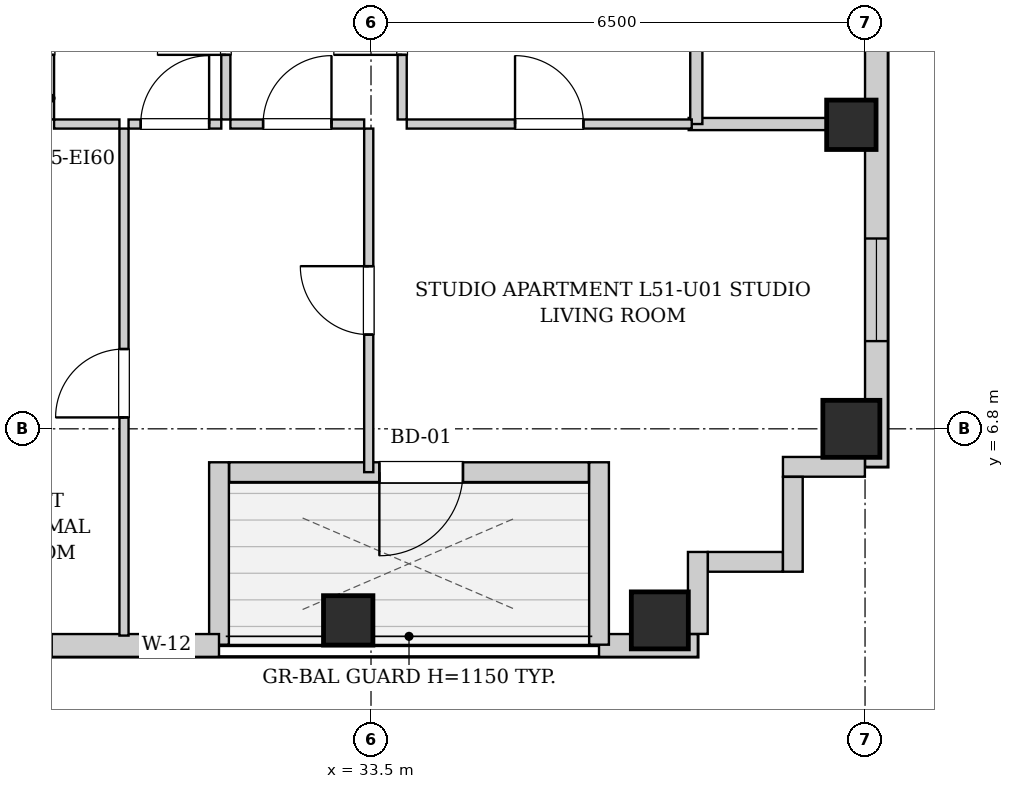
"""IFC4 building model, lengths in metres.
Left out: names, types, materials, properties, quantities, classifications, styles, units other than length and angle.
Written with IfcOpenShell. Run it as: python <this file> out.ifc"""

import sys

from ifc_helpers import new_model, si_unit, direction, frame, frame_2d, origin, origin_2d, place, context, subcontext, project, spatial, rectangle, extrude, element, fill, save


model = new_model("IFC4")
c1 = context("Model", 3, precision=1e-05, world=origin(), true_north=direction((0.0, 1.0)))
c2 = subcontext(c1, "Body", "Model", "MODEL_VIEW")
j1 = project(units=[si_unit("LENGTHUNIT", "METRE"), si_unit("PLANEANGLEUNIT", "RADIAN")], contexts=[c1])
p1 = place(None, origin())
s1 = spatial("IfcSite", under=j1, at=p1, CompositionType="ELEMENT")
p2 = place(p1, origin())
s2 = spatial("IfcBuilding", under=s1, at=p2, CompositionType="ELEMENT")
p3 = place(p2, frame((0.0, 0.0, 177.7)))
s3 = spatial("IfcBuildingStorey", under=s2, at=p3, CompositionType="ELEMENT", Elevation=177.7)
p4 = place(p3, frame((33.2, 4.28, 0.0), z_axis=(0.0, 0.0, 1.0), x_axis=(1.0, 0.0, 0.0)))
e1 = element("IfcColumn", 1, at=p4, inside=s3, PredefinedType="COLUMN", context=c2, shape_type="SweptSolid", body=[
    extrude(rectangle(XDim=0.65, YDim=0.65, at=origin_2d()), origin(), (0.0, 0.0, 1.0), 3.3),
])
for number, where, z_axis, x_axis in (
    (2, (37.3, 4.28, 0.0), (0.0, 0.0, 1.0), (1.0, 0.0, 0.0)),
    (3, (39.82, 6.8, 0.0), (0.0, 0.0, 1.0), (1.0, 0.0, 0.0)),
):
    element("IfcColumn", number, at=place(p3, frame(where, z_axis=z_axis, x_axis=x_axis)), inside=s3, PredefinedType="COLUMN", context=c2, shape_type="SweptSolid", body=[
        extrude(rectangle(XDim=0.75, YDim=0.75, at=origin_2d()), origin(), (0.0, 0.0, 1.0), 3.3),
    ])
p5 = place(p3, frame((39.82, 10.8, 0.0), z_axis=(0.0, 0.0, 1.0), x_axis=(1.0, 0.0, 0.0)))
e4 = element("IfcColumn", 4, at=p5, inside=s3, PredefinedType="COLUMN", context=c2, shape_type="SweptSolid", body=[
    extrude(rectangle(XDim=0.65, YDim=0.65, at=origin_2d()), origin(), (0.0, 0.0, 1.0), 3.3),
])
p6 = place(p3, frame((40.15, 37.7, 0.0), z_axis=(0.0, 0.0, 1.0), x_axis=(0.0, -1.0, 0.0)))
e5 = element("IfcWall", 5, at=p6, inside=s3, PredefinedType="SOLIDWALL", context=c2, shape_type="SweptSolid", body=[
    extrude(rectangle(XDim=31.4, YDim=0.3, at=frame_2d((15.7, 0.0))), origin(), (0.0, 0.0, 1.0), 3.04),
])
p7 = place(p6, frame((28.396, 0.0, 0.55)))
e6 = element("IfcOpeningElement", 6, at=p7, cuts=e5, PredefinedType="OPENING", context=c2, shape_type="SweptSolid", body=[
    extrude(rectangle(XDim=1.35, YDim=1.2, at=frame_2d((0.675, 0.6))), frame((0.0, 0.16, 0.0), z_axis=(0.0, -1.0, 0.0), x_axis=(1.0, 0.0, 0.0)), (0.0, 0.0, 1.0), 0.32),
])
p8 = place(p6, frame((1.653, 0.0, 0.55)))
e7 = element("IfcOpeningElement", 7, at=p8, cuts=e5, PredefinedType="OPENING", context=c2, shape_type="SweptSolid", body=[
    extrude(rectangle(XDim=1.35, YDim=1.2, at=frame_2d((0.675, 0.6))), frame((0.0, 0.16, 0.0), z_axis=(0.0, -1.0, 0.0), x_axis=(1.0, 0.0, 0.0)), (0.0, 0.0, 1.0), 0.32),
])
p9 = place(p6, frame((19.683, 0.0, 0.55)))
e8 = element("IfcOpeningElement", 8, at=p9, cuts=e5, PredefinedType="OPENING", context=c2, shape_type="SweptSolid", body=[
    extrude(rectangle(XDim=1.35, YDim=1.2, at=frame_2d((0.675, 0.6))), frame((0.0, 0.16, 0.0), z_axis=(0.0, -1.0, 0.0), x_axis=(1.0, 0.0, 0.0)), (0.0, 0.0, 1.0), 0.32),
])
p10 = place(p6, frame((10.367, 0.0, 0.55)))
e9 = element("IfcOpeningElement", 9, at=p10, cuts=e5, PredefinedType="OPENING", context=c2, shape_type="SweptSolid", body=[
    extrude(rectangle(XDim=1.35, YDim=1.2, at=frame_2d((0.675, 0.6))), frame((0.0, 0.16, 0.0), z_axis=(0.0, -1.0, 0.0), x_axis=(1.0, 0.0, 0.0)), (0.0, 0.0, 1.0), 0.32),
])
p11 = place(p3, frame((37.8, 3.95, 0.0), z_axis=(0.0, 0.0, 1.0), x_axis=(-1.0, 0.0, 0.0)))
e10 = element("IfcWall", 10, at=p11, inside=s3, PredefinedType="SOLIDWALL", context=c2, shape_type="SweptSolid", body=[
    extrude(rectangle(XDim=1.3, YDim=0.3, at=frame_2d((0.65, 0.0))), origin(), (0.0, 0.0, 1.0), 3.04),
])
p12 = place(p3, frame((36.5, 3.96, 0.0), z_axis=(0.0, 0.0, 1.0), x_axis=(0.0, 1.0, 0.0)))
e11 = element("IfcWall", 11, at=p12, inside=s3, PredefinedType="SOLIDWALL", context=c2, shape_type="SweptSolid", body=[
    extrude(rectangle(XDim=2.4, YDim=0.26, at=frame_2d((1.2, 0.0))), origin(), (0.0, 0.0, 1.0), 3.04),
])
p13 = place(p3, frame((36.366, 6.23, 0.0), z_axis=(0.0, 0.0, 1.0), x_axis=(-1.0, 0.0, 0.0)))
e12 = element("IfcWall", 12, at=p13, inside=s3, PredefinedType="SOLIDWALL", context=c2, shape_type="SweptSolid", body=[
    extrude(rectangle(XDim=4.732, YDim=0.26, at=frame_2d((2.366, 0.0))), origin(), (0.0, 0.0, 1.0), 3.04),
])
p14 = place(p13, frame((1.656, 0.0, 0.0)))
e13 = element("IfcOpeningElement", 13, at=p14, cuts=e12, PredefinedType="OPENING", context=c2, shape_type="SweptSolid", body=[
    extrude(rectangle(XDim=1.1, YDim=2.0, at=frame_2d((0.55, 1.0))), frame((0.0, 0.14, 0.0), z_axis=(0.0, -1.0, 0.0), x_axis=(1.0, 0.0, 0.0)), (0.0, 0.0, 1.0), 0.28),
])
p15 = place(p3, frame((31.5, 6.36, 0.0), z_axis=(0.0, 0.0, 1.0), x_axis=(0.0, -1.0, 0.0)))
e14 = element("IfcWall", 14, at=p15, inside=s3, PredefinedType="SOLIDWALL", context=c2, shape_type="SweptSolid", body=[
    extrude(rectangle(XDim=2.4, YDim=0.26, at=frame_2d((1.2, 0.0))), origin(), (0.0, 0.0, 1.0), 3.04),
])
p16 = place(p3, frame((31.5, 3.95, 0.0), z_axis=(0.0, 0.0, 1.0), x_axis=(-1.0, 0.0, 0.0)))
e15 = element("IfcWall", 15, at=p16, inside=s3, PredefinedType="SOLIDWALL", context=c2, shape_type="SweptSolid", body=[
    extrude(rectangle(XDim=11.2, YDim=0.3, at=frame_2d((5.6, 0.0))), origin(), (0.0, 0.0, 1.0), 3.04),
])
p17 = place(p16, frame((9.0, 0.0, 0.55)))
e16 = element("IfcOpeningElement", 16, at=p17, cuts=e15, PredefinedType="OPENING", context=c2, shape_type="SweptSolid", body=[
    extrude(rectangle(XDim=1.35, YDim=1.2, at=frame_2d((0.675, 0.6))), frame((0.0, 0.16, 0.0), z_axis=(0.0, -1.0, 0.0), x_axis=(1.0, 0.0, 0.0)), (0.0, 0.0, 1.0), 0.32),
])
p18 = place(p16, frame((2.201, 0.0, 0.55)))
e17 = element("IfcOpeningElement", 17, at=p18, cuts=e15, PredefinedType="OPENING", context=c2, shape_type="SweptSolid", body=[
    extrude(rectangle(XDim=1.35, YDim=1.2, at=frame_2d((0.675, 0.6))), frame((0.0, 0.16, 0.0), z_axis=(0.0, -1.0, 0.0), x_axis=(1.0, 0.0, 0.0)), (0.0, 0.0, 1.0), 0.32),
])
p19 = place(p16, frame((0.35, 0.0, 0.55)))
e18 = element("IfcOpeningElement", 18, at=p19, cuts=e15, PredefinedType="OPENING", context=c2, shape_type="SweptSolid", body=[
    extrude(rectangle(XDim=0.68, YDim=1.2, at=frame_2d((0.34, 0.6))), frame((0.0, 0.16, 0.0), z_axis=(0.0, -1.0, 0.0), x_axis=(1.0, 0.0, 0.0)), (0.0, 0.0, 1.0), 0.32),
])
p20 = place(p3, frame((39.998, 6.3, 0.0), z_axis=(0.0, 0.0, 1.0), x_axis=(-1.0, 0.0, 0.0)))
e19 = element("IfcWall", 19, at=p20, inside=s3, PredefinedType="SOLIDWALL", context=c2, shape_type="SweptSolid", body=[
    extrude(rectangle(XDim=1.078, YDim=0.26, at=frame_2d((0.539, 0.0))), origin(), (0.0, 0.0, 1.0), 3.04),
])
p21 = place(p3, frame((39.05, 6.168, 0.0), z_axis=(0.0, 0.0, 1.0), x_axis=(0.0, -1.0, 0.0)))
e20 = element("IfcWall", 20, at=p21, inside=s3, PredefinedType="SOLIDWALL", context=c2, shape_type="SweptSolid", body=[
    extrude(rectangle(XDim=1.248, YDim=0.26, at=frame_2d((0.624, 0.0))), origin(), (0.0, 0.0, 1.0), 3.04),
])
p22 = place(p3, frame((38.918, 5.05, 0.0), z_axis=(0.0, 0.0, 1.0), x_axis=(-1.0, 0.0, 0.0)))
e21 = element("IfcWall", 21, at=p22, inside=s3, PredefinedType="SOLIDWALL", context=c2, shape_type="SweptSolid", body=[
    extrude(rectangle(XDim=0.986, YDim=0.26, at=frame_2d((0.493, 0.0))), origin(), (0.0, 0.0, 1.0), 3.04),
])
p23 = place(p3, frame((37.8, 5.18, 0.0), z_axis=(0.0, 0.0, 1.0), x_axis=(0.0, -1.0, 0.0)))
e22 = element("IfcWall", 22, at=p23, inside=s3, PredefinedType="SOLIDWALL", context=c2, shape_type="SweptSolid", body=[
    extrude(rectangle(XDim=1.078, YDim=0.26, at=frame_2d((0.539, 0.0))), origin(), (0.0, 0.0, 1.0), 3.04),
])
p24 = place(p3, frame((37.68, 10.81, 0.0), z_axis=(0.0, 0.0, 1.0), x_axis=(1.0, 0.0, 0.0)))
e23 = element("IfcWall", 23, at=p24, inside=s3, PredefinedType="PARTITIONING", context=c2, shape_type="SweptSolid", body=[
    extrude(rectangle(XDim=2.34, YDim=0.16, at=frame_2d((1.17, 0.0))), origin(), (0.0, 0.0, 1.0), 3.04),
])
p25 = place(p3, frame((37.78, 10.81, 0.0), z_axis=(0.0, 0.0, 1.0), x_axis=(0.0, 1.0, 0.0)))
e24 = element("IfcWall", 24, at=p25, inside=s3, PredefinedType="PARTITIONING", context=c2, shape_type="SweptSolid", body=[
    extrude(rectangle(XDim=2.66, YDim=0.16, at=frame_2d((1.33, 0.0))), origin(), (0.0, 0.0, 1.0), 3.04),
])
p26 = place(p3, frame((29.27, 10.87, 0.0), z_axis=(0.0, 0.0, 1.0), x_axis=(0.0, 1.0, 0.0)))
e25 = element("IfcWall", 25, at=p26, inside=s3, PredefinedType="PARTITIONING", context=c2, shape_type="SweptSolid", body=[
    extrude(rectangle(XDim=2.6, YDim=0.12, at=frame_2d((1.3, 0.0))), origin(), (0.0, 0.0, 1.0), 3.04),
])
p27 = place(p26, frame((0.85, 0.0, 0.0)))
e26 = element("IfcOpeningElement", 26, at=p27, cuts=e25, PredefinedType="OPENING", context=c2, shape_type="SweptSolid", body=[
    extrude(rectangle(XDim=0.9, YDim=2.05, at=frame_2d((0.45, 1.025))), frame((0.0, 0.07, 0.0), z_axis=(0.0, -1.0, 0.0), x_axis=(1.0, 0.0, 0.0)), (0.0, 0.0, 1.0), 0.14),
])
p28 = place(p3, frame((31.59, 10.87, 0.0), z_axis=(0.0, 0.0, 1.0), x_axis=(0.0, 1.0, 0.0)))
e27 = element("IfcWall", 27, at=p28, inside=s3, PredefinedType="PARTITIONING", context=c2, shape_type="SweptSolid", body=[
    extrude(rectangle(XDim=2.6, YDim=0.12, at=frame_2d((1.3, 0.0))), origin(), (0.0, 0.0, 1.0), 3.04),
])
p29 = place(p28, frame((0.85, 0.0, 0.0)))
e28 = element("IfcOpeningElement", 28, at=p29, cuts=e27, PredefinedType="OPENING", context=c2, shape_type="SweptSolid", body=[
    extrude(rectangle(XDim=0.9, YDim=2.05, at=frame_2d((0.45, 1.025))), frame((0.0, 0.07, 0.0), z_axis=(0.0, -1.0, 0.0), x_axis=(1.0, 0.0, 0.0)), (0.0, 0.0, 1.0), 0.14),
])
p30 = place(p3, frame((29.33, 10.81, 0.0), z_axis=(0.0, 0.0, 1.0), x_axis=(1.0, 0.0, 0.0)))
e29 = element("IfcWall", 29, at=p30, inside=s3, PredefinedType="PARTITIONING", context=c2, shape_type="SweptSolid", body=[
    extrude(rectangle(XDim=0.86, YDim=0.12, at=frame_2d((0.43, 0.0))), origin(), (0.0, 0.0, 1.0), 3.04),
])
p31 = place(p3, frame((30.31, 10.81, 0.0), z_axis=(0.0, 0.0, 1.0), x_axis=(1.0, 0.0, 0.0)))
e30 = element("IfcWall", 30, at=p31, inside=s3, PredefinedType="PARTITIONING", context=c2, shape_type="SweptSolid", body=[
    extrude(rectangle(XDim=1.22, YDim=0.12, at=frame_2d((0.61, 0.0))), origin(), (0.0, 0.0, 1.0), 3.04),
])
p32 = place(p31, frame((0.16, 0.0, 0.0)))
e31 = element("IfcOpeningElement", 31, at=p32, cuts=e30, PredefinedType="OPENING", context=c2, shape_type="SweptSolid", body=[
    extrude(rectangle(XDim=0.9, YDim=2.05, at=frame_2d((0.45, 1.025))), frame((0.0, 0.07, 0.0), z_axis=(0.0, -1.0, 0.0), x_axis=(1.0, 0.0, 0.0)), (0.0, 0.0, 1.0), 0.14),
])
p33 = place(p3, frame((33.91, 10.87, 0.0), z_axis=(0.0, 0.0, 1.0), x_axis=(0.0, 1.0, 0.0)))
e32 = element("IfcWall", 32, at=p33, inside=s3, PredefinedType="PARTITIONING", context=c2, shape_type="SweptSolid", body=[
    extrude(rectangle(XDim=2.6, YDim=0.12, at=frame_2d((1.3, 0.0))), origin(), (0.0, 0.0, 1.0), 3.04),
])
p34 = place(p33, frame((0.85, 0.0, 0.0)))
e33 = element("IfcOpeningElement", 33, at=p34, cuts=e32, PredefinedType="OPENING", context=c2, shape_type="SweptSolid", body=[
    extrude(rectangle(XDim=0.9, YDim=2.05, at=frame_2d((0.45, 1.025))), frame((0.0, 0.07, 0.0), z_axis=(0.0, -1.0, 0.0), x_axis=(1.0, 0.0, 0.0)), (0.0, 0.0, 1.0), 0.14),
])
p35 = place(p3, frame((31.65, 10.81, 0.0), z_axis=(0.0, 0.0, 1.0), x_axis=(1.0, 0.0, 0.0)))
e34 = element("IfcWall", 34, at=p35, inside=s3, PredefinedType="PARTITIONING", context=c2, shape_type="SweptSolid", body=[
    extrude(rectangle(XDim=1.76, YDim=0.12, at=frame_2d((0.88, 0.0))), origin(), (0.0, 0.0, 1.0), 3.04),
])
p36 = place(p35, frame((0.43, 0.0, 0.0)))
e35 = element("IfcOpeningElement", 35, at=p36, cuts=e34, PredefinedType="OPENING", context=c2, shape_type="SweptSolid", body=[
    extrude(rectangle(XDim=0.9, YDim=2.05, at=frame_2d((0.45, 1.025))), frame((0.0, 0.07, 0.0), z_axis=(0.0, -1.0, 0.0), x_axis=(1.0, 0.0, 0.0)), (0.0, 0.0, 1.0), 0.14),
])
p37 = place(p3, frame((33.97, 10.81, 0.0), z_axis=(0.0, 0.0, 1.0), x_axis=(1.0, 0.0, 0.0)))
e36 = element("IfcWall", 36, at=p37, inside=s3, PredefinedType="PARTITIONING", context=c2, shape_type="SweptSolid", body=[
    extrude(rectangle(XDim=3.75, YDim=0.12, at=frame_2d((1.875, 0.0))), origin(), (0.0, 0.0, 1.0), 3.04),
])
p38 = place(p37, frame((1.425, 0.0, 0.0)))
e37 = element("IfcOpeningElement", 37, at=p38, cuts=e36, PredefinedType="OPENING", context=c2, shape_type="SweptSolid", body=[
    extrude(rectangle(XDim=0.9, YDim=2.05, at=frame_2d((0.45, 1.025))), frame((0.0, 0.07, 0.0), z_axis=(0.0, -1.0, 0.0), x_axis=(1.0, 0.0, 0.0)), (0.0, 0.0, 1.0), 0.14),
])
p39 = place(p3, frame((30.25, 4.08, 0.0), z_axis=(0.0, 0.0, 1.0), x_axis=(0.0, 1.0, 0.0)))
e38 = element("IfcWall", 38, at=p39, inside=s3, PredefinedType="PARTITIONING", context=c2, shape_type="SweptSolid", body=[
    extrude(rectangle(XDim=6.67, YDim=0.12, at=frame_2d((3.335, 0.0))), origin(), (0.0, 0.0, 1.0), 3.04),
])
p40 = place(p39, frame((2.87, 0.0, 0.0)))
e39 = element("IfcOpeningElement", 39, at=p40, cuts=e38, PredefinedType="OPENING", context=c2, shape_type="SweptSolid", body=[
    extrude(rectangle(XDim=0.9, YDim=2.05, at=frame_2d((0.45, 1.025))), frame((0.0, 0.07, 0.0), z_axis=(0.0, -1.0, 0.0), x_axis=(1.0, 0.0, 0.0)), (0.0, 0.0, 1.0), 0.14),
])
p41 = place(p3, frame((33.47, 6.23, 0.0), z_axis=(0.0, 0.0, 1.0), x_axis=(0.0, 1.0, 0.0)))
e40 = element("IfcWall", 40, at=p41, inside=s3, PredefinedType="PARTITIONING", context=c2, shape_type="SweptSolid", body=[
    extrude(rectangle(XDim=4.52, YDim=0.12, at=frame_2d((2.26, 0.0))), origin(), (0.0, 0.0, 1.0), 3.04),
])
p42 = place(p41, frame((1.81, 0.0, 0.0)))
e41 = element("IfcOpeningElement", 41, at=p42, cuts=e40, PredefinedType="OPENING", context=c2, shape_type="SweptSolid", body=[
    extrude(rectangle(XDim=0.9, YDim=2.05, at=frame_2d((0.45, 1.025))), frame((0.0, 0.07, 0.0), z_axis=(0.0, -1.0, 0.0), x_axis=(1.0, 0.0, 0.0)), (0.0, 0.0, 1.0), 0.14),
])
p43 = place(p29, origin())
e42 = element("IfcDoor", 42, at=p43, inside=s3, OperationType="SINGLE_SWING_LEFT", PredefinedType="DOOR", context=c2, shape_type="SweptSolid", body=[
    extrude(rectangle(XDim=0.9, YDim=2.05, at=frame_2d((0.45, 1.025))), frame((0.0, 0.025, 0.0), z_axis=(0.0, -1.0, 0.0), x_axis=(1.0, 0.0, 0.0)), (0.0, 0.0, 1.0), 0.05),
])
fill(e28, e42)
p44 = place(p32, origin())
e43 = element("IfcDoor", 43, at=p44, inside=s3, OperationType="SINGLE_SWING_RIGHT", PredefinedType="DOOR", context=c2, shape_type="SweptSolid", body=[
    extrude(rectangle(XDim=0.9, YDim=2.05, at=frame_2d((0.45, 1.025))), frame((0.0, 0.025, 0.0), z_axis=(0.0, -1.0, 0.0), x_axis=(1.0, 0.0, 0.0)), (0.0, 0.0, 1.0), 0.05),
])
fill(e31, e43)
p45 = place(p34, origin())
e44 = element("IfcDoor", 44, at=p45, inside=s3, OperationType="SINGLE_SWING_LEFT", PredefinedType="DOOR", context=c2, shape_type="SweptSolid", body=[
    extrude(rectangle(XDim=0.9, YDim=2.05, at=frame_2d((0.45, 1.025))), frame((0.0, 0.025, 0.0), z_axis=(0.0, -1.0, 0.0), x_axis=(1.0, 0.0, 0.0)), (0.0, 0.0, 1.0), 0.05),
])
fill(e33, e44)
p46 = place(p36, origin())
e45 = element("IfcDoor", 45, at=p46, inside=s3, OperationType="SINGLE_SWING_RIGHT", PredefinedType="DOOR", context=c2, shape_type="SweptSolid", body=[
    extrude(rectangle(XDim=0.9, YDim=2.05, at=frame_2d((0.45, 1.025))), frame((0.0, 0.025, 0.0), z_axis=(0.0, -1.0, 0.0), x_axis=(1.0, 0.0, 0.0)), (0.0, 0.0, 1.0), 0.05),
])
fill(e35, e45)
p47 = place(p38, origin())
e46 = element("IfcDoor", 46, at=p47, inside=s3, OperationType="SINGLE_SWING_LEFT", PredefinedType="DOOR", context=c2, shape_type="SweptSolid", body=[
    extrude(rectangle(XDim=0.9, YDim=2.05, at=frame_2d((0.45, 1.025))), frame((0.0, 0.025, 0.0), z_axis=(0.0, -1.0, 0.0), x_axis=(1.0, 0.0, 0.0)), (0.0, 0.0, 1.0), 0.05),
])
fill(e37, e46)
p48 = place(p40, origin())
e47 = element("IfcDoor", 47, at=p48, inside=s3, OperationType="SINGLE_SWING_LEFT", PredefinedType="DOOR", context=c2, shape_type="SweptSolid", body=[
    extrude(rectangle(XDim=0.9, YDim=2.05, at=frame_2d((0.45, 1.025))), frame((0.0, 0.025, 0.0), z_axis=(0.0, -1.0, 0.0), x_axis=(1.0, 0.0, 0.0)), (0.0, 0.0, 1.0), 0.05),
])
fill(e39, e47)
p49 = place(p42, origin())
e48 = element("IfcDoor", 48, at=p49, inside=s3, OperationType="SINGLE_SWING_RIGHT", PredefinedType="DOOR", context=c2, shape_type="SweptSolid", body=[
    extrude(rectangle(XDim=0.9, YDim=2.05, at=frame_2d((0.45, 1.025))), frame((0.0, 0.025, 0.0), z_axis=(0.0, -1.0, 0.0), x_axis=(1.0, 0.0, 0.0)), (0.0, 0.0, 1.0), 0.05),
])
fill(e41, e48)
p50 = place(p14, origin())
e49 = element("IfcDoor", 49, at=p50, inside=s3, OperationType="SINGLE_SWING_RIGHT", PredefinedType="DOOR", context=c2, shape_type="SweptSolid", body=[
    extrude(rectangle(XDim=1.1, YDim=2.0, at=frame_2d((0.55, 1.0))), frame((0.0, 0.025, 0.0), z_axis=(0.0, -1.0, 0.0), x_axis=(1.0, 0.0, 0.0)), (0.0, 0.0, 1.0), 0.05),
])
fill(e13, e49)
p51 = place(p19, origin())
e50 = element("IfcWindow", 50, at=p51, inside=s3, PartitioningType="SINGLE_PANEL", PredefinedType="WINDOW", context=c2, shape_type="SweptSolid", body=[
    extrude(rectangle(XDim=0.68, YDim=1.2, at=frame_2d((0.34, 0.6))), frame((0.0, 0.03, 0.0), z_axis=(0.0, -1.0, 0.0), x_axis=(1.0, 0.0, 0.0)), (0.0, 0.0, 1.0), 0.06),
])
fill(e18, e50)
p52 = place(p7, origin())
e51 = element("IfcWindow", 51, at=p52, inside=s3, PartitioningType="SINGLE_PANEL", PredefinedType="WINDOW", context=c2, shape_type="SweptSolid", body=[
    extrude(rectangle(XDim=1.35, YDim=1.2, at=frame_2d((0.675, 0.6))), frame((0.0, 0.03, 0.0), z_axis=(0.0, -1.0, 0.0), x_axis=(1.0, 0.0, 0.0)), (0.0, 0.0, 1.0), 0.06),
])
fill(e6, e51)
save(model, sys.argv[1])
